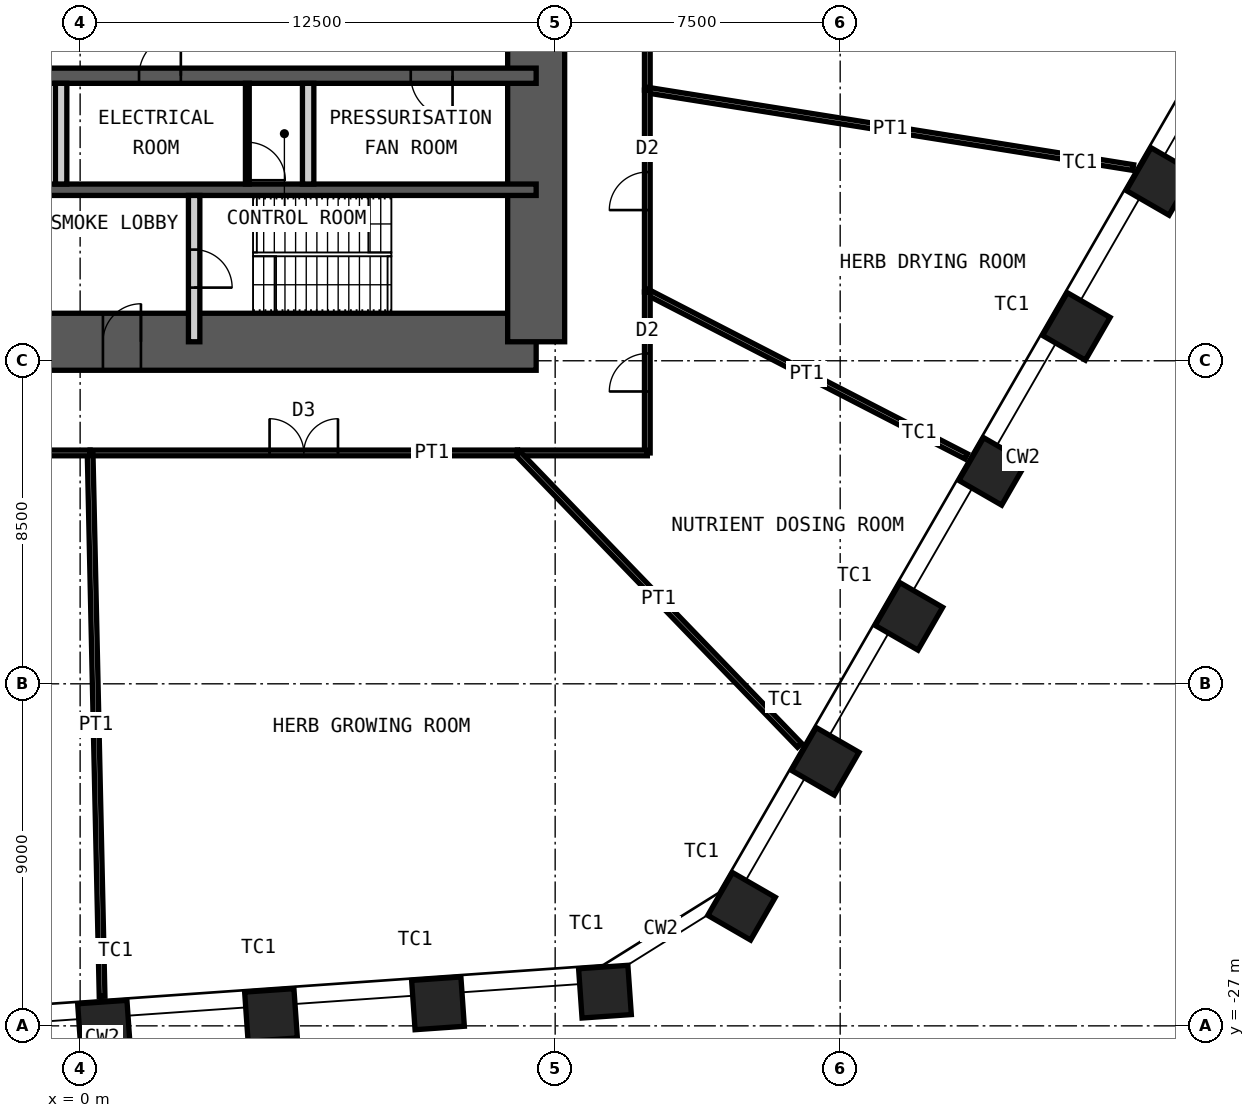
"""IFC4 building model, lengths in metres.
Left out: names, types, materials, properties, quantities, classifications, styles, units other than length and angle.
Written with IfcOpenShell. Run it as: python <this file> out.ifc"""

import sys

from ifc_helpers import new_model, si_unit, direction, frame, frame_2d, origin, origin_2d, place, context, subcontext, project, spatial, rectangle, hollow_rectangle, extrude, element, fill, save


model = new_model("IFC4")
c1 = context("Model", 3, precision=1e-05, world=origin(), true_north=direction((0.0, 1.0)))
c2 = subcontext(c1, "Body", "Model", "MODEL_VIEW")
j1 = project(units=[si_unit("LENGTHUNIT", "METRE"), si_unit("PLANEANGLEUNIT", "RADIAN")], contexts=[c1])
p1 = place(None, origin())
s1 = spatial("IfcSite", under=j1, at=p1, CompositionType="ELEMENT")
p2 = place(p1, origin())
s2 = spatial("IfcBuilding", under=s1, at=p2, CompositionType="ELEMENT")
p3 = place(p2, frame((0.0, 0.0, 52.0)))
s3 = spatial("IfcBuildingStorey", under=s2, at=p3, CompositionType="ELEMENT", Elevation=52.0)
for number, where, z_axis, x_axis in (
    (1, (28.416, -4.782, 0.0), (0.0, 0.0, 1.0), (0.5, 0.866, 0.0)),
    (2, (26.214, -8.596, 0.0), (0.0, 0.0, 1.0), (0.5, 0.866, 0.0)),
    (3, (24.011, -12.411, 0.0), (0.0, 0.0, 1.0), (0.5, 0.866, 0.0)),
    (4, (21.809, -16.225, 0.0), (0.0, 0.0, 1.0), (0.5, 0.866, 0.0)),
    (5, (19.607, -20.04, 0.0), (0.0, 0.0, 1.0), (0.5, 0.866, 0.0)),
    (6, (17.405, -23.854, 0.0), (0.0, 0.0, 1.0), (0.5, 0.866, 0.0)),
    (7, (13.811, -26.1, 0.0), (0.0, 0.0, 1.0), (0.998, 0.07, 0.0)),
    (8, (9.417, -26.407, 0.0), (0.0, 0.0, 1.0), (0.998, 0.07, 0.0)),
    (9, (5.023, -26.715, 0.0), (0.0, 0.0, 1.0), (0.998, 0.07, 0.0)),
    (10, (0.629, -27.022, 0.0), (0.0, 0.0, 1.0), (0.998, 0.07, 0.0)),
):
    element("IfcColumn", number, at=place(p3, frame(where, z_axis=z_axis, x_axis=x_axis)), inside=s3, PredefinedType="COLUMN", context=c2, shape_type="SweptSolid", body=[
        extrude(hollow_rectangle(XDim=1.3, YDim=1.3, WallThickness=0.1, at=origin_2d()), origin(), (0.0, 0.0, 1.0), 5.0),
    ])
p4 = place(p3, frame((-12.0, -9.0, 0.0), z_axis=(0.0, 0.0, 1.0), x_axis=(1.0, 0.0, 0.0)))
e11 = element("IfcWall", 11, at=p4, inside=s3, PredefinedType="SHEAR", context=c2, shape_type="SweptSolid", body=[
    extrude(rectangle(XDim=24.0, YDim=1.5, at=frame_2d((12.0, 0.0))), origin(), (0.0, 0.0, 1.0), 5.0),
])
p5 = place(p4, frame((1.35, 0.0, 0.0)))
e12 = element("IfcOpeningElement", 12, at=p5, cuts=e11, PredefinedType="OPENING", context=c2, shape_type="SweptSolid", body=[
    extrude(rectangle(XDim=1.0, YDim=2.1, at=frame_2d((0.5, 1.05))), frame((0.0, 0.76, 0.0), z_axis=(0.0, -1.0, 0.0), x_axis=(1.0, 0.0, 0.0)), (0.0, 0.0, 1.0), 1.52),
])
p6 = place(p4, frame((5.325, 0.0, 0.0)))
e13 = element("IfcOpeningElement", 13, at=p6, cuts=e11, PredefinedType="OPENING", context=c2, shape_type="SweptSolid", body=[
    extrude(rectangle(XDim=1.15, YDim=2.1, at=frame_2d((0.575, 1.05))), frame((0.0, 0.76, 0.0), z_axis=(0.0, -1.0, 0.0), x_axis=(1.0, 0.0, 0.0)), (0.0, 0.0, 1.0), 1.52),
])
p7 = place(p4, frame((12.6, 0.0, 0.0)))
e14 = element("IfcOpeningElement", 14, at=p7, cuts=e11, PredefinedType="OPENING", context=c2, shape_type="SweptSolid", body=[
    extrude(rectangle(XDim=1.0, YDim=2.1, at=frame_2d((0.5, 1.05))), frame((0.0, 0.76, 0.0), z_axis=(0.0, -1.0, 0.0), x_axis=(1.0, 0.0, 0.0)), (0.0, 0.0, 1.0), 1.52),
])
p8 = place(p3, frame((12.0, -9.0, 0.0), z_axis=(0.0, 0.0, 1.0), x_axis=(0.0, 1.0, 0.0)))
e15 = element("IfcWall", 15, at=p8, inside=s3, PredefinedType="SHEAR", context=c2, shape_type="SweptSolid", body=[
    extrude(rectangle(XDim=18.0, YDim=1.5, at=frame_2d((9.0, 0.0))), origin(), (0.0, 0.0, 1.0), 5.0),
])
p9 = place(p8, frame((8.1, 0.0, 0.0)))
e16 = element("IfcOpeningElement", 16, at=p9, cuts=e15, PredefinedType="OPENING", context=c2, shape_type="SweptSolid", body=[
    extrude(rectangle(XDim=1.8, YDim=2.1, at=frame_2d((0.9, 1.05))), frame((0.0, 0.76, 0.0), z_axis=(0.0, -1.0, 0.0), x_axis=(1.0, 0.0, 0.0)), (0.0, 0.0, 1.0), 1.52),
])
p10 = place(p3, frame((-12.0, -2.0, 0.0), z_axis=(0.0, 0.0, 1.0), x_axis=(1.0, 0.0, 0.0)))
e17 = element("IfcWall", 17, at=p10, inside=s3, PredefinedType="SHEAR", context=c2, shape_type="SweptSolid", body=[
    extrude(rectangle(XDim=24.0, YDim=0.4, at=frame_2d((12.0, 0.0))), origin(), (0.0, 0.0, 1.0), 5.0),
])
p11 = place(p10, frame((1.1, 0.0, 0.0)))
e18 = element("IfcOpeningElement", 18, at=p11, cuts=e17, PredefinedType="OPENING", context=c2, shape_type="SweptSolid", body=[
    extrude(rectangle(XDim=1.1, YDim=2.1, at=frame_2d((0.55, 1.05))), frame((0.0, 0.21, 0.0), z_axis=(0.0, -1.0, 0.0), x_axis=(1.0, 0.0, 0.0)), (0.0, 0.0, 1.0), 0.42),
])
p12 = place(p10, frame((13.55, 0.0, 0.0)))
e19 = element("IfcOpeningElement", 19, at=p12, cuts=e17, PredefinedType="OPENING", context=c2, shape_type="SweptSolid", body=[
    extrude(rectangle(XDim=1.1, YDim=2.1, at=frame_2d((0.55, 1.05))), frame((0.0, 0.21, 0.0), z_axis=(0.0, -1.0, 0.0), x_axis=(1.0, 0.0, 0.0)), (0.0, 0.0, 1.0), 0.42),
])
p13 = place(p10, frame((20.7, 0.0, 0.0)))
e20 = element("IfcOpeningElement", 20, at=p13, cuts=e17, PredefinedType="OPENING", context=c2, shape_type="SweptSolid", body=[
    extrude(rectangle(XDim=1.1, YDim=2.1, at=frame_2d((0.55, 1.05))), frame((0.0, 0.21, 0.0), z_axis=(0.0, -1.0, 0.0), x_axis=(1.0, 0.0, 0.0)), (0.0, 0.0, 1.0), 0.42),
])
p14 = place(p3, frame((-12.0, -5.0, 0.0), z_axis=(0.0, 0.0, 1.0), x_axis=(1.0, 0.0, 0.0)))
e21 = element("IfcWall", 21, at=p14, inside=s3, PredefinedType="SHEAR", context=c2, shape_type="SweptSolid", body=[
    extrude(rectangle(XDim=24.0, YDim=0.3, at=frame_2d((12.0, 0.0))), origin(), (0.0, 0.0, 1.0), 5.0),
])
for number, where, z_axis, x_axis in (
    (22, (-0.5, -4.85, 0.0), (0.0, 0.0, 1.0), (0.0, 1.0, 0.0)),
    (23, (6.0, -4.85, 0.0), (0.0, 0.0, 1.0), (0.0, 1.0, 0.0)),
):
    element("IfcWall", number, at=place(p3, frame(where, z_axis=z_axis, x_axis=x_axis)), inside=s3, PredefinedType="PARTITIONING", context=c2, shape_type="SweptSolid", body=[
        extrude(rectangle(XDim=2.65, YDim=0.3, at=frame_2d((1.325, 0.0))), origin(), (0.0, 0.0, 1.0), 4.78),
    ])
p15 = place(p3, frame((3.0, -9.0, 0.0), z_axis=(0.0, 0.0, 1.0), x_axis=(0.0, 1.0, 0.0)))
e24 = element("IfcWall", 24, at=p15, inside=s3, PredefinedType="PARTITIONING", context=c2, shape_type="SweptSolid", body=[
    extrude(rectangle(XDim=3.85, YDim=0.3, at=frame_2d((1.925, 0.0))), origin(), (0.0, 0.0, 1.0), 4.78),
])
p16 = place(p15, frame((1.425, 0.0, 0.0)))
e25 = element("IfcOpeningElement", 25, at=p16, cuts=e24, PredefinedType="OPENING", context=c2, shape_type="SweptSolid", body=[
    extrude(rectangle(XDim=1.0, YDim=2.1, at=frame_2d((0.5, 1.05))), frame((0.0, 0.16, 0.0), z_axis=(0.0, -1.0, 0.0), x_axis=(1.0, 0.0, 0.0)), (0.0, 0.0, 1.0), 0.32),
])
p17 = place(p3, frame((4.4, -4.85, 0.0), z_axis=(0.0, 0.0, 1.0), x_axis=(0.0, 1.0, 0.0)))
e26 = element("IfcWall", 26, at=p17, inside=s3, PredefinedType="PARTITIONING", context=c2, shape_type="SweptSolid", body=[
    extrude(rectangle(XDim=2.65, YDim=0.1, at=frame_2d((1.325, 0.0))), origin(), (0.0, 0.0, 1.0), 4.78),
])
p18 = place(p17, frame((0.1, 0.0, 0.0)))
e27 = element("IfcOpeningElement", 27, at=p18, cuts=e26, PredefinedType="OPENING", context=c2, shape_type="SweptSolid", body=[
    extrude(rectangle(XDim=1.0, YDim=2.4, at=frame_2d((0.5, 1.2))), frame((0.0, 0.06, 0.0), z_axis=(0.0, -1.0, 0.0), x_axis=(1.0, 0.0, 0.0)), (0.0, 0.0, 1.0), 0.12),
])
p19 = place(p3, frame((14.925, 9.061, 0.0), z_axis=(0.0, 0.0, 1.0), x_axis=(0.0, -1.0, 0.0)))
e28 = element("IfcWall", 28, at=p19, inside=s3, PredefinedType="PARTITIONING", context=c2, shape_type="SweptSolid", body=[
    extrude(rectangle(XDim=11.439, YDim=0.15, at=frame_2d((5.72, 0.0))), origin(), (0.0, 0.0, 1.0), 4.8),
])
p20 = place(p19, frame((4.82, 0.0, 0.0)))
e29 = element("IfcOpeningElement", 29, at=p20, cuts=e28, PredefinedType="OPENING", context=c2, shape_type="SweptSolid", body=[
    extrude(rectangle(XDim=1.8, YDim=2.4, at=frame_2d((0.9, 1.2))), frame((0.0, 0.085, 0.0), z_axis=(0.0, -1.0, 0.0), x_axis=(1.0, 0.0, 0.0)), (0.0, 0.0, 1.0), 0.17),
])
p21 = place(p3, frame((27.711, -4.416, 0.0), z_axis=(0.0, 0.0, 1.0), x_axis=(-0.987539045088, 0.157374186021, 0.0)))
e30 = element("IfcWall", 30, at=p21, inside=s3, PredefinedType="PARTITIONING", context=c2, shape_type="SweptSolid", body=[
    extrude(rectangle(XDim=12.948, YDim=0.15, at=frame_2d((6.474, 0.0))), origin(), (0.0, 0.0, 1.0), 3.7),
])
p22 = place(p3, frame((14.925, -2.378, 0.0), z_axis=(0.0, 0.0, 1.0), x_axis=(0.0, -1.0, 0.0)))
e31 = element("IfcWall", 31, at=p22, inside=s3, PredefinedType="PARTITIONING", context=c2, shape_type="SweptSolid", body=[
    extrude(rectangle(XDim=5.312, YDim=0.15, at=frame_2d((2.656, 0.0))), origin(), (0.0, 0.0, 1.0), 4.8),
])
p23 = place(p22, frame((2.156, 0.0, 0.0)))
e32 = element("IfcOpeningElement", 32, at=p23, cuts=e31, PredefinedType="OPENING", context=c2, shape_type="SweptSolid", body=[
    extrude(rectangle(XDim=1.0, YDim=2.4, at=frame_2d((0.5, 1.2))), frame((0.0, 0.085, 0.0), z_axis=(0.0, -1.0, 0.0), x_axis=(1.0, 0.0, 0.0)), (0.0, 0.0, 1.0), 0.17),
])
p24 = place(p3, frame((23.316, -12.015, 0.0), z_axis=(0.0, 0.0, 1.0), x_axis=(-0.888914247068, 0.458073641851, 0.0)))
e33 = element("IfcWall", 33, at=p24, inside=s3, PredefinedType="PARTITIONING", context=c2, shape_type="SweptSolid", body=[
    extrude(rectangle(XDim=9.44, YDim=0.15, at=frame_2d((4.72, 0.0))), origin(), (0.0, 0.0, 1.0), 3.7),
])
p25 = place(p3, frame((14.925, -7.691, 0.0), z_axis=(0.0, 0.0, 1.0), x_axis=(0.0, -1.0, 0.0)))
e34 = element("IfcWall", 34, at=p25, inside=s3, PredefinedType="PARTITIONING", context=c2, shape_type="SweptSolid", body=[
    extrude(rectangle(XDim=4.234, YDim=0.15, at=frame_2d((2.117, 0.0))), origin(), (0.0, 0.0, 1.0), 4.8),
])
p26 = place(p25, frame((1.617, 0.0, 0.0)))
e35 = element("IfcOpeningElement", 35, at=p26, cuts=e34, PredefinedType="OPENING", context=c2, shape_type="SweptSolid", body=[
    extrude(rectangle(XDim=1.0, YDim=2.4, at=frame_2d((0.5, 1.2))), frame((0.0, 0.085, 0.0), z_axis=(0.0, -1.0, 0.0), x_axis=(1.0, 0.0, 0.0)), (0.0, 0.0, 1.0), 0.17),
])
p27 = place(p3, frame((14.925, -11.925, 0.0), z_axis=(0.0, 0.0, 1.0), x_axis=(-1.0, 0.0, 0.0)))
e36 = element("IfcWall", 36, at=p27, inside=s3, PredefinedType="PARTITIONING", context=c2, shape_type="SweptSolid", body=[
    extrude(rectangle(XDim=3.417, YDim=0.15, at=frame_2d((1.709, 0.0))), origin(), (0.0, 0.0, 1.0), 4.8),
])
p28 = place(p3, frame((18.931, -19.618, 0.0), z_axis=(0.0, 0.0, 1.0), x_axis=(-0.694400087022, 0.719589132175, 0.0)))
e37 = element("IfcWall", 37, at=p28, inside=s3, PredefinedType="PARTITIONING", context=c2, shape_type="SweptSolid", body=[
    extrude(rectangle(XDim=10.691, YDim=0.15, at=frame_2d((5.345, 0.0))), origin(), (0.0, 0.0, 1.0), 3.7),
])
p29 = place(p3, frame((11.508, -11.925, 0.0), z_axis=(0.0, 0.0, 1.0), x_axis=(-1.0, 0.0, 0.0)))
e38 = element("IfcWall", 38, at=p29, inside=s3, PredefinedType="PARTITIONING", context=c2, shape_type="SweptSolid", body=[
    extrude(rectangle(XDim=11.245, YDim=0.15, at=frame_2d((5.623, 0.0))), origin(), (0.0, 0.0, 1.0), 4.8),
])
p30 = place(p29, frame((4.722, 0.0, 0.0)))
e39 = element("IfcOpeningElement", 39, at=p30, cuts=e38, PredefinedType="OPENING", context=c2, shape_type="SweptSolid", body=[
    extrude(rectangle(XDim=1.8, YDim=2.4, at=frame_2d((0.9, 1.2))), frame((0.0, 0.085, 0.0), z_axis=(0.0, -1.0, 0.0), x_axis=(1.0, 0.0, 0.0)), (0.0, 0.0, 1.0), 0.17),
])
p31 = place(p3, frame((0.578, -26.224, 0.0), z_axis=(0.0, 0.0, 1.0), x_axis=(-0.022037776667, 0.999757138709, 0.0)))
e40 = element("IfcWall", 40, at=p31, inside=s3, PredefinedType="PARTITIONING", context=c2, shape_type="SweptSolid", body=[
    extrude(rectangle(XDim=14.302, YDim=0.15, at=frame_2d((7.151, 0.0))), origin(), (0.0, 0.0, 1.0), 3.7),
])
p32 = place(p3, frame((0.263, -11.925, 0.0), z_axis=(0.0, 0.0, 1.0), x_axis=(-1.0, 0.0, 0.0)))
e41 = element("IfcWall", 41, at=p32, inside=s3, PredefinedType="PARTITIONING", context=c2, shape_type="SweptSolid", body=[
    extrude(rectangle(XDim=5.778, YDim=0.15, at=frame_2d((2.889, 0.0))), origin(), (0.0, 0.0, 1.0), 4.8),
])
p33 = place(p32, frame((1.989, 0.0, 0.0)))
e42 = element("IfcOpeningElement", 42, at=p33, cuts=e41, PredefinedType="OPENING", context=c2, shape_type="SweptSolid", body=[
    extrude(rectangle(XDim=1.8, YDim=2.4, at=frame_2d((0.9, 1.2))), frame((0.0, 0.085, 0.0), z_axis=(0.0, -1.0, 0.0), x_axis=(1.0, 0.0, 0.0)), (0.0, 0.0, 1.0), 0.17),
])
p34 = place(p7, origin())
e43 = element("IfcDoor", 43, at=p34, inside=s3, OperationType="SINGLE_SWING_LEFT", PredefinedType="DOOR", context=c2, shape_type="SweptSolid", body=[
    extrude(rectangle(XDim=1.0, YDim=2.1, at=frame_2d((0.5, 1.05))), frame((0.0, 0.025, 0.0), z_axis=(0.0, -1.0, 0.0), x_axis=(1.0, 0.0, 0.0)), (0.0, 0.0, 1.0), 0.05),
])
fill(e14, e43)
p35 = place(p16, origin())
e44 = element("IfcDoor", 44, at=p35, inside=s3, OperationType="SINGLE_SWING_LEFT", PredefinedType="DOOR", context=c2, shape_type="SweptSolid", body=[
    extrude(rectangle(XDim=1.0, YDim=2.1, at=frame_2d((0.5, 1.05))), frame((0.0, 0.025, 0.0), z_axis=(0.0, -1.0, 0.0), x_axis=(1.0, 0.0, 0.0)), (0.0, 0.0, 1.0), 0.05),
])
fill(e25, e44)
p36 = place(p12, origin())
e45 = element("IfcDoor", 45, at=p36, inside=s3, OperationType="SINGLE_SWING_LEFT", PredefinedType="DOOR", context=c2, shape_type="SweptSolid", body=[
    extrude(rectangle(XDim=1.1, YDim=2.1, at=frame_2d((0.55, 1.05))), frame((0.0, 0.025, 0.0), z_axis=(0.0, -1.0, 0.0), x_axis=(1.0, 0.0, 0.0)), (0.0, 0.0, 1.0), 0.05),
])
fill(e19, e45)
p37 = place(p13, origin())
e46 = element("IfcDoor", 46, at=p37, inside=s3, OperationType="SINGLE_SWING_RIGHT", PredefinedType="DOOR", context=c2, shape_type="SweptSolid", body=[
    extrude(rectangle(XDim=1.1, YDim=2.1, at=frame_2d((0.55, 1.05))), frame((0.0, 0.025, 0.0), z_axis=(0.0, -1.0, 0.0), x_axis=(1.0, 0.0, 0.0)), (0.0, 0.0, 1.0), 0.05),
])
fill(e20, e46)
p38 = place(p18, origin())
e47 = element("IfcDoor", 47, at=p38, inside=s3, OperationType="SINGLE_SWING_LEFT", PredefinedType="DOOR", context=c2, shape_type="SweptSolid", body=[
    extrude(rectangle(XDim=1.0, YDim=2.4, at=frame_2d((0.5, 1.2))), frame((0.0, 0.025, 0.0), z_axis=(0.0, -1.0, 0.0), x_axis=(1.0, 0.0, 0.0)), (0.0, 0.0, 1.0), 0.05),
])
fill(e27, e47)
p39 = place(p23, origin())
e48 = element("IfcDoor", 48, at=p39, inside=s3, OperationType="SINGLE_SWING_RIGHT", PredefinedType="DOOR", context=c2, shape_type="SweptSolid", body=[
    extrude(rectangle(XDim=1.0, YDim=2.4, at=frame_2d((0.5, 1.2))), frame((0.0, 0.025, 0.0), z_axis=(0.0, -1.0, 0.0), x_axis=(1.0, 0.0, 0.0)), (0.0, 0.0, 1.0), 0.05),
])
fill(e32, e48)
p40 = place(p26, origin())
e49 = element("IfcDoor", 49, at=p40, inside=s3, OperationType="SINGLE_SWING_RIGHT", PredefinedType="DOOR", context=c2, shape_type="SweptSolid", body=[
    extrude(rectangle(XDim=1.0, YDim=2.4, at=frame_2d((0.5, 1.2))), frame((0.0, 0.025, 0.0), z_axis=(0.0, -1.0, 0.0), x_axis=(1.0, 0.0, 0.0)), (0.0, 0.0, 1.0), 0.05),
])
fill(e35, e49)
p41 = place(p30, origin())
e50 = element("IfcDoor", 50, at=p41, inside=s3, OperationType="DOUBLE_DOOR_DOUBLE_SWING", PredefinedType="DOOR", context=c2, shape_type="SweptSolid", body=[
    extrude(rectangle(XDim=1.8, YDim=2.4, at=frame_2d((0.9, 1.2))), frame((0.0, 0.025, 0.0), z_axis=(0.0, -1.0, 0.0), x_axis=(1.0, 0.0, 0.0)), (0.0, 0.0, 1.0), 0.05),
])
fill(e39, e50)
save(model, sys.argv[1])
